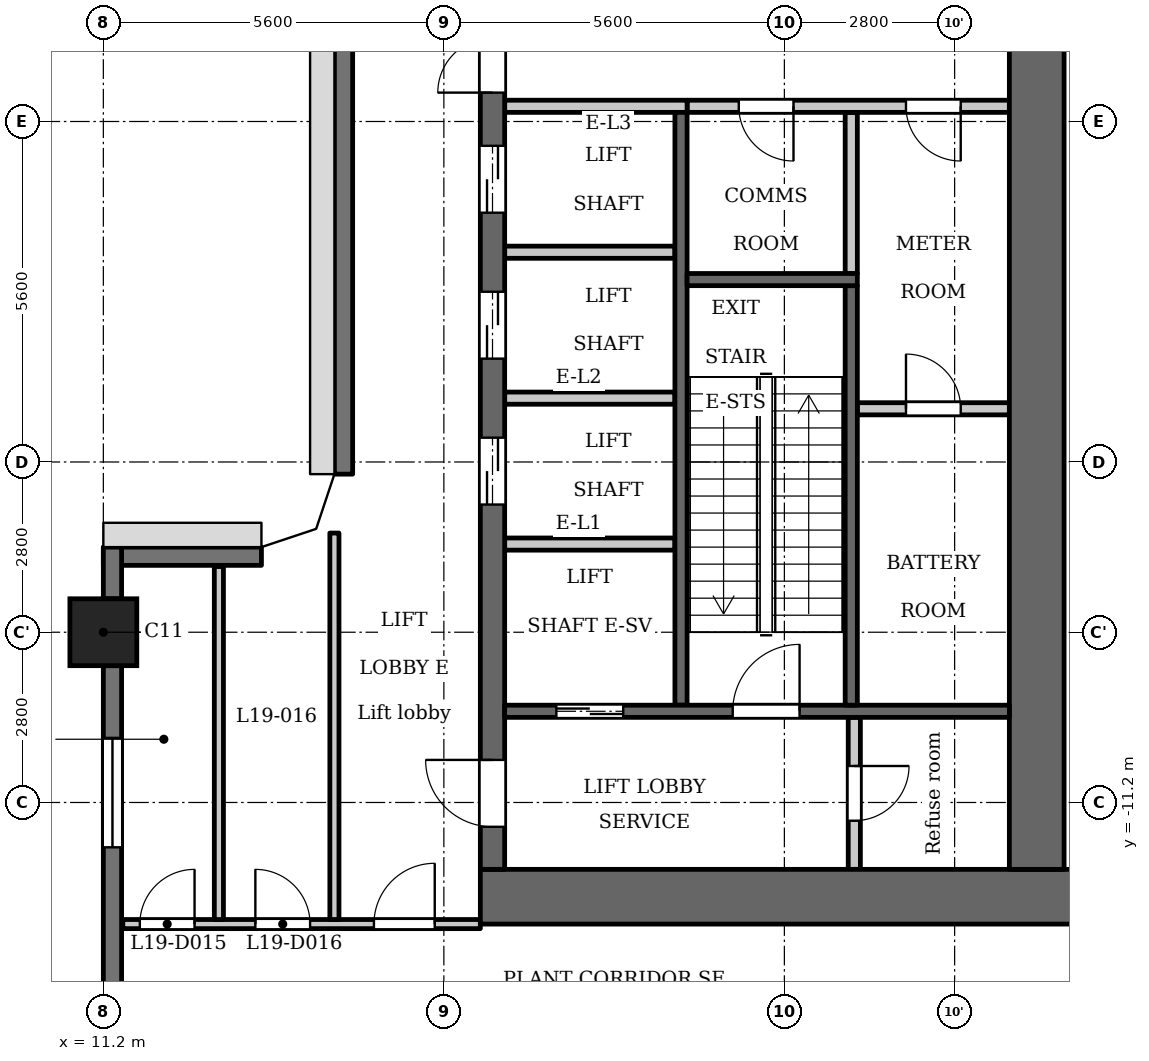
"""IFC4 building model, lengths in metres.
Left out: names, types, materials, properties, quantities, classifications, styles, units other than length and angle.
Written with IfcOpenShell. Run it as: python <this file> out.ifc"""

import sys

from ifc_helpers import new_model, si_unit, direction, frame, frame_2d, origin, origin_2d, place, context, subcontext, project, spatial, polyline, rectangle, outline, extrude, element, fill, save


model = new_model("IFC4")
c1 = context("Model", 3, precision=1e-05, world=origin(), true_north=direction((0.0, 1.0)))
c2 = subcontext(c1, "Body", "Model", "MODEL_VIEW")
j1 = project(units=[si_unit("LENGTHUNIT", "METRE"), si_unit("PLANEANGLEUNIT", "RADIAN")], contexts=[c1])
p1 = place(None, origin())
s1 = spatial("IfcSite", under=j1, at=p1, CompositionType="ELEMENT")
p2 = place(p1, origin())
s2 = spatial("IfcBuilding", under=s1, at=p2, CompositionType="ELEMENT")
p3 = place(p2, frame((0.0, 0.0, 77.9)))
s3 = spatial("IfcBuildingStorey", under=s2, at=p3, CompositionType="ELEMENT", Elevation=77.9)
p4 = place(p3, frame((11.2, -8.4, 0.0), z_axis=(0.0, 0.0, 1.0), x_axis=(1.0, 0.0, 0.0)))
e1 = element("IfcColumn", 1, at=p4, inside=s3, PredefinedType="COLUMN", context=c2, shape_type="SweptSolid", body=[
    extrude(rectangle(XDim=1.1, YDim=1.1, at=origin_2d()), origin(), (0.0, 0.0, 1.0), 5.4),
])
p5 = place(p3, frame((13.8, -7.15, 0.0), z_axis=(0.0, 0.0, 1.0), x_axis=(-1.0, 0.0, 0.0)))
e2 = element("IfcWall", 2, at=p5, inside=s3, PredefinedType="SOLIDWALL", context=c2, shape_type="SweptSolid", body=[
    extrude(rectangle(XDim=2.6, YDim=0.3, at=frame_2d((1.3, 0.0))), origin(), (0.0, 0.0, 1.0), 5.1),
])
p6 = place(p3, frame((11.35, -7.0, 0.0), z_axis=(0.0, 0.0, 1.0), x_axis=(0.0, -1.0, 0.0)))
e3 = element("IfcWall", 3, at=p6, inside=s3, PredefinedType="SOLIDWALL", context=c2, shape_type="SweptSolid", body=[
    extrude(rectangle(XDim=0.85, YDim=0.3, at=frame_2d((0.425, 0.0))), origin(), (0.0, 0.0, 1.0), 5.1),
])
p7 = place(p3, frame((11.35, -8.95, 0.0), z_axis=(0.0, 0.0, 1.0), x_axis=(0.0, -1.0, 0.0)))
e4 = element("IfcWall", 4, at=p7, inside=s3, PredefinedType="SOLIDWALL", context=c2, shape_type="SweptSolid", body=[
    extrude(rectangle(XDim=5.975, YDim=0.3, at=frame_2d((2.988, 0.0))), origin(), (0.0, 0.0, 1.0), 5.1),
])
p8 = place(p7, frame((1.188, 0.0, 0.9)))
e5 = element("IfcOpeningElement", 5, at=p8, cuts=e4, PredefinedType="OPENING", context=c2, shape_type="SweptSolid", body=[
    extrude(rectangle(XDim=1.8, YDim=1.5, at=frame_2d((0.9, 0.75))), frame((0.0, 0.16, 0.0), z_axis=(0.0, -1.0, 0.0), x_axis=(1.0, 0.0, 0.0)), (0.0, 0.0, 1.0), 0.32),
])
p9 = place(p3, frame((15.15, 5.8, 0.0), z_axis=(0.0, 0.0, 1.0), x_axis=(0.0, -1.0, 0.0)))
e6 = element("IfcWall", 6, at=p9, inside=s3, PredefinedType="SOLIDWALL", context=c2, shape_type="SweptSolid", body=[
    extrude(rectangle(XDim=11.6, YDim=0.3, at=frame_2d((5.8, 0.0))), origin(), (0.0, 0.0, 1.0), 5.1),
])
p10 = place(p3, frame((23.5, -2.5, 0.0), z_axis=(0.0, 0.0, 1.0), x_axis=(0.0, 1.0, 0.0)))
e7 = element("IfcWall", 7, at=p10, inside=s3, PredefinedType="PARTITIONING", context=c2, shape_type="SweptSolid", body=[
    extrude(rectangle(XDim=2.65, YDim=0.2, at=frame_2d((1.325, 0.0))), origin(), (0.0, 0.0, 1.0), 5.1),
])
p11 = place(p3, frame((20.7, -9.6, 0.0), z_axis=(0.0, 0.0, 1.0), x_axis=(0.0, 1.0, 0.0)))
e8 = element("IfcWall", 8, at=p11, inside=s3, PredefinedType="SHEAR", context=c2, shape_type="SweptSolid", body=[
    extrude(rectangle(XDim=9.75, YDim=0.2, at=frame_2d((4.875, 0.0))), origin(), (0.0, 0.0, 1.0), 5.1),
])
p12 = place(p3, frame((20.8, 0.25, 0.0), z_axis=(0.0, 0.0, 1.0), x_axis=(1.0, 0.0, 0.0)))
e9 = element("IfcWall", 9, at=p12, inside=s3, PredefinedType="PARTITIONING", context=c2, shape_type="SweptSolid", body=[
    extrude(rectangle(XDim=5.3, YDim=0.2, at=frame_2d((2.65, 0.0))), origin(), (0.0, 0.0, 1.0), 5.1),
])
p13 = place(p12, frame((0.85, 0.0, 0.0)))
e10 = element("IfcOpeningElement", 10, at=p13, cuts=e9, PredefinedType="OPENING", context=c2, shape_type="SweptSolid", body=[
    extrude(rectangle(XDim=0.9, YDim=2.1, at=frame_2d((0.45, 1.05))), frame((0.0, 0.11, 0.0), z_axis=(0.0, -1.0, 0.0), x_axis=(1.0, 0.0, 0.0)), (0.0, 0.0, 1.0), 0.22),
])
p14 = place(p12, frame((3.6, 0.0, 0.0)))
e11 = element("IfcOpeningElement", 11, at=p14, cuts=e9, PredefinedType="OPENING", context=c2, shape_type="SweptSolid", body=[
    extrude(rectangle(XDim=0.9, YDim=2.1, at=frame_2d((0.45, 1.05))), frame((0.0, 0.11, 0.0), z_axis=(0.0, -1.0, 0.0), x_axis=(1.0, 0.0, 0.0)), (0.0, 0.0, 1.0), 0.22),
])
p15 = place(p3, frame((17.4, -12.75, 0.0), z_axis=(0.0, 0.0, 1.0), x_axis=(1.0, 0.0, 0.0)))
e12 = element("IfcWall", 12, at=p15, inside=s3, PredefinedType="SHEAR", context=c2, shape_type="SweptSolid", body=[
    extrude(rectangle(XDim=10.4, YDim=0.9, at=frame_2d((5.2, 0.0))), origin(), (0.0, 0.0, 1.0), 5.1),
])
p16 = place(p3, frame((17.6, -12.3, 0.0), z_axis=(0.0, 0.0, 1.0), x_axis=(0.0, 1.0, 0.0)))
e13 = element("IfcWall", 13, at=p16, inside=s3, PredefinedType="SHEAR", context=c2, shape_type="SweptSolid", body=[
    extrude(rectangle(XDim=24.6, YDim=0.4, at=frame_2d((12.3, 0.0))), origin(), (0.0, 0.0, 1.0), 5.1),
])
p17 = place(p16, frame((6.0, 0.0, 0.0)))
e14 = element("IfcOpeningElement", 14, at=p17, cuts=e13, PredefinedType="OPENING", context=c2, shape_type="SweptSolid", body=[
    extrude(rectangle(XDim=1.1, YDim=2.1, at=frame_2d((0.55, 1.05))), frame((0.0, 0.21, 0.0), z_axis=(0.0, -1.0, 0.0), x_axis=(1.0, 0.0, 0.0)), (0.0, 0.0, 1.0), 0.42),
])
p18 = place(p16, frame((8.4, 0.0, 0.0)))
e15 = element("IfcOpeningElement", 15, at=p18, cuts=e13, PredefinedType="OPENING", context=c2, shape_type="SweptSolid", body=[
    extrude(rectangle(XDim=1.1, YDim=2.1, at=frame_2d((0.55, 1.05))), frame((0.0, 0.21, 0.0), z_axis=(0.0, -1.0, 0.0), x_axis=(1.0, 0.0, 0.0)), (0.0, 0.0, 1.0), 0.42),
])
p19 = place(p16, frame((10.8, 0.0, 0.0)))
e16 = element("IfcOpeningElement", 16, at=p19, cuts=e13, PredefinedType="OPENING", context=c2, shape_type="SweptSolid", body=[
    extrude(rectangle(XDim=1.1, YDim=2.1, at=frame_2d((0.55, 1.05))), frame((0.0, 0.21, 0.0), z_axis=(0.0, -1.0, 0.0), x_axis=(1.0, 0.0, 0.0)), (0.0, 0.0, 1.0), 0.42),
])
p20 = place(p16, frame((16.75, 0.0, 0.0)))
e17 = element("IfcOpeningElement", 17, at=p20, cuts=e13, PredefinedType="OPENING", context=c2, shape_type="SweptSolid", body=[
    extrude(rectangle(XDim=0.9, YDim=2.1, at=frame_2d((0.45, 1.05))), frame((0.0, 0.21, 0.0), z_axis=(0.0, -1.0, 0.0), x_axis=(1.0, 0.0, 0.0)), (0.0, 0.0, 1.0), 0.42),
])
p21 = place(p16, frame((22.8, 0.0, 0.0)))
e18 = element("IfcOpeningElement", 18, at=p21, cuts=e13, PredefinedType="OPENING", context=c2, shape_type="SweptSolid", body=[
    extrude(rectangle(XDim=1.1, YDim=2.1, at=frame_2d((0.55, 1.05))), frame((0.0, 0.21, 0.0), z_axis=(0.0, -1.0, 0.0), x_axis=(1.0, 0.0, 0.0)), (0.0, 0.0, 1.0), 0.42),
])
p22 = place(p16, frame((0.7, 0.0, 0.0)))
e19 = element("IfcOpeningElement", 19, at=p22, cuts=e13, PredefinedType="OPENING", context=c2, shape_type="SweptSolid", body=[
    extrude(rectangle(XDim=1.1, YDim=2.1, at=frame_2d((0.55, 1.05))), frame((0.0, 0.21, 0.0), z_axis=(0.0, -1.0, 0.0), x_axis=(1.0, 0.0, 0.0)), (0.0, 0.0, 1.0), 0.42),
])
p23 = place(p16, frame((12.775, 0.0, 0.0)))
e20 = element("IfcOpeningElement", 20, at=p23, cuts=e13, PredefinedType="OPENING", context=c2, shape_type="SweptSolid", body=[
    extrude(rectangle(XDim=1.8, YDim=2.1, at=frame_2d((0.9, 1.05))), frame((0.0, 0.21, 0.0), z_axis=(0.0, -1.0, 0.0), x_axis=(1.0, 0.0, 0.0)), (0.0, 0.0, 1.0), 0.42),
])
p24 = place(p3, frame((26.55, -12.3, 0.0), z_axis=(0.0, 0.0, 1.0), x_axis=(0.0, 1.0, 0.0)))
e21 = element("IfcWall", 21, at=p24, inside=s3, PredefinedType="SHEAR", context=c2, shape_type="SweptSolid", body=[
    extrude(rectangle(XDim=24.6, YDim=0.9, at=frame_2d((12.3, 0.0))), origin(), (0.0, 0.0, 1.0), 5.1),
])
p25 = place(p3, frame((23.55, -12.3, 0.0), z_axis=(0.0, 0.0, 1.0), x_axis=(0.0, 1.0, 0.0)))
e22 = element("IfcWall", 22, at=p25, inside=s3, PredefinedType="PARTITIONING", context=c2, shape_type="SweptSolid", body=[
    extrude(rectangle(XDim=2.5, YDim=0.2, at=frame_2d((1.25, 0.0))), origin(), (0.0, 0.0, 1.0), 5.1),
])
p26 = place(p25, frame((0.8, 0.0, 0.0)))
e23 = element("IfcOpeningElement", 23, at=p26, cuts=e22, PredefinedType="OPENING", context=c2, shape_type="SweptSolid", body=[
    extrude(rectangle(XDim=0.9, YDim=2.1, at=frame_2d((0.45, 1.05))), frame((0.0, 0.11, 0.0), z_axis=(0.0, -1.0, 0.0), x_axis=(1.0, 0.0, 0.0)), (0.0, 0.0, 1.0), 0.22),
])
p27 = place(p3, frame((23.6, -4.725, 0.0), z_axis=(0.0, 0.0, 1.0), x_axis=(1.0, 0.0, 0.0)))
e24 = element("IfcWall", 24, at=p27, inside=s3, PredefinedType="PARTITIONING", context=c2, shape_type="SweptSolid", body=[
    extrude(rectangle(XDim=2.5, YDim=0.2, at=frame_2d((1.25, 0.0))), origin(), (0.0, 0.0, 1.0), 5.1),
])
p28 = place(p27, frame((0.8, 0.0, 0.0)))
e25 = element("IfcOpeningElement", 25, at=p28, cuts=e24, PredefinedType="OPENING", context=c2, shape_type="SweptSolid", body=[
    extrude(rectangle(XDim=0.9, YDim=2.1, at=frame_2d((0.45, 1.05))), frame((0.0, 0.11, 0.0), z_axis=(0.0, -1.0, 0.0), x_axis=(1.0, 0.0, 0.0)), (0.0, 0.0, 1.0), 0.22),
])
p29 = place(p3, frame((17.8, -9.7, 0.0), z_axis=(0.0, 0.0, 1.0), x_axis=(1.0, 0.0, 0.0)))
e26 = element("IfcWall", 26, at=p29, inside=s3, PredefinedType="SHEAR", context=c2, shape_type="SweptSolid", body=[
    extrude(rectangle(XDim=8.3, YDim=0.2, at=frame_2d((4.15, 0.0))), origin(), (0.0, 0.0, 1.0), 5.1),
])
p30 = place(p29, frame((0.85, 0.0, 0.0)))
e27 = element("IfcOpeningElement", 27, at=p30, cuts=e26, PredefinedType="OPENING", context=c2, shape_type="SweptSolid", body=[
    extrude(rectangle(XDim=1.1, YDim=2.1, at=frame_2d((0.55, 1.05))), frame((0.0, 0.11, 0.0), z_axis=(0.0, -1.0, 0.0), x_axis=(1.0, 0.0, 0.0)), (0.0, 0.0, 1.0), 0.22),
])
p31 = place(p29, frame((3.75, 0.0, 0.0)))
e28 = element("IfcOpeningElement", 28, at=p31, cuts=e26, PredefinedType="OPENING", context=c2, shape_type="SweptSolid", body=[
    extrude(rectangle(XDim=1.1, YDim=2.1, at=frame_2d((0.55, 1.05))), frame((0.0, 0.11, 0.0), z_axis=(0.0, -1.0, 0.0), x_axis=(1.0, 0.0, 0.0)), (0.0, 0.0, 1.0), 0.22),
])
for number, where, z_axis, x_axis in (
    (29, (17.8, -6.95, 0.0), (0.0, 0.0, 1.0), (1.0, 0.0, 0.0)),
    (30, (17.8, -4.55, 0.0), (0.0, 0.0, 1.0), (1.0, 0.0, 0.0)),
    (31, (17.8, -2.15, 0.0), (0.0, 0.0, 1.0), (1.0, 0.0, 0.0)),
):
    element("IfcWall", number, at=place(p3, frame(where, z_axis=z_axis, x_axis=x_axis)), inside=s3, PredefinedType="PARTITIONING", context=c2, shape_type="SweptSolid", body=[
        extrude(rectangle(XDim=2.8, YDim=0.2, at=frame_2d((1.4, 0.0))), origin(), (0.0, 0.0, 1.0), 5.1),
    ])
p32 = place(p3, frame((17.8, 0.25, 0.0), z_axis=(0.0, 0.0, 1.0), x_axis=(1.0, 0.0, 0.0)))
e32 = element("IfcWall", 32, at=p32, inside=s3, PredefinedType="PARTITIONING", context=c2, shape_type="SweptSolid", body=[
    extrude(rectangle(XDim=3.0, YDim=0.2, at=frame_2d((1.5, 0.0))), origin(), (0.0, 0.0, 1.0), 5.1),
])
p33 = place(p3, frame((23.5, -9.6, 0.0), z_axis=(0.0, 0.0, 1.0), x_axis=(0.0, 1.0, 0.0)))
e33 = element("IfcWall", 33, at=p33, inside=s3, PredefinedType="SHEAR", context=c2, shape_type="SweptSolid", body=[
    extrude(rectangle(XDim=6.9, YDim=0.2, at=frame_2d((3.45, 0.0))), origin(), (0.0, 0.0, 1.0), 5.1),
])
p34 = place(p3, frame((20.8, -2.6, 0.0), z_axis=(0.0, 0.0, 1.0), x_axis=(1.0, 0.0, 0.0)))
e34 = element("IfcWall", 34, at=p34, inside=s3, PredefinedType="SHEAR", context=c2, shape_type="SweptSolid", body=[
    extrude(rectangle(XDim=2.8, YDim=0.2, at=frame_2d((1.4, 0.0))), origin(), (0.0, 0.0, 1.0), 5.1),
])
p35 = place(p3, frame((11.52, -13.2, 0.0), z_axis=(0.0, 0.0, 1.0), x_axis=(1.0, 0.0, 0.0)))
e35 = element("IfcWall", 35, at=p35, inside=s3, PredefinedType="PARTITIONING", context=c2, shape_type="SweptSolid", body=[
    extrude(rectangle(XDim=5.88, YDim=0.15, at=frame_2d((2.94, 0.0))), origin(), (0.0, 0.0, 1.0), 5.1),
])
p36 = place(p35, frame((4.13, 0.0, 0.0)))
e36 = element("IfcOpeningElement", 36, at=p36, cuts=e35, PredefinedType="OPENING", context=c2, shape_type="SweptSolid", body=[
    extrude(rectangle(XDim=1.0, YDim=2.1, at=frame_2d((0.5, 1.05))), frame((0.0, 0.085, 0.0), z_axis=(0.0, -1.0, 0.0), x_axis=(1.0, 0.0, 0.0)), (0.0, 0.0, 1.0), 0.17),
])
p37 = place(p35, frame((0.28, 0.0, 0.0)))
e37 = element("IfcOpeningElement", 37, at=p37, cuts=e35, PredefinedType="OPENING", context=c2, shape_type="SweptSolid", body=[
    extrude(rectangle(XDim=0.9, YDim=2.1, at=frame_2d((0.45, 1.05))), frame((0.0, 0.085, 0.0), z_axis=(0.0, -1.0, 0.0), x_axis=(1.0, 0.0, 0.0)), (0.0, 0.0, 1.0), 0.17),
])
p38 = place(p35, frame((2.18, 0.0, 0.0)))
e38 = element("IfcOpeningElement", 38, at=p38, cuts=e35, PredefinedType="OPENING", context=c2, shape_type="SweptSolid", body=[
    extrude(rectangle(XDim=0.9, YDim=2.1, at=frame_2d((0.45, 1.05))), frame((0.0, 0.085, 0.0), z_axis=(0.0, -1.0, 0.0), x_axis=(1.0, 0.0, 0.0)), (0.0, 0.0, 1.0), 0.17),
])
p39 = place(p3, frame((13.1, -13.125, 0.0), z_axis=(0.0, 0.0, 1.0), x_axis=(0.0, 1.0, 0.0)))
e39 = element("IfcWall", 39, at=p39, inside=s3, PredefinedType="PARTITIONING", context=c2, shape_type="SweptSolid", body=[
    extrude(rectangle(XDim=5.805, YDim=0.15, at=frame_2d((2.902, 0.0))), origin(), (0.0, 0.0, 1.0), 5.1),
])
p40 = place(p3, frame((15.0, -13.125, 0.0), z_axis=(0.0, 0.0, 1.0), x_axis=(0.0, 1.0, 0.0)))
e40 = element("IfcWall", 40, at=p40, inside=s3, PredefinedType="PARTITIONING", context=c2, shape_type="SweptSolid", body=[
    extrude(rectangle(XDim=6.356, YDim=0.15, at=frame_2d((3.178, 0.0))), origin(), (0.0, 0.0, 1.0), 5.1),
])
p41 = place(p3, origin())
e41 = element("IfcWall", 41, at=p41, inside=s3, PredefinedType="SOLIDWALL", context=c2, shape_type="SweptSolid", body=[
    extrude(outline(polyline([(15.0, -5.8), (14.7, -6.7), (13.8, -7.0), (13.8, -7.3), (13.849, -7.3), (14.937, -6.937), (15.3, -5.849), (15.3, -5.8), (15.0, -5.8)])), origin(), (0.0, 0.0, 1.0), 5.1),
])
p42 = place(p30, origin())
e42 = element("IfcDoor", 42, at=p42, inside=s3, OperationType="DOUBLE_DOOR_SLIDING", PredefinedType="DOOR", context=c2, shape_type="SweptSolid", body=[
    extrude(rectangle(XDim=1.1, YDim=2.1, at=frame_2d((0.55, 1.05))), frame((0.0, 0.025, 0.0), z_axis=(0.0, -1.0, 0.0), x_axis=(1.0, 0.0, 0.0)), (0.0, 0.0, 1.0), 0.05),
])
fill(e27, e42)
p43 = place(p17, origin())
e43 = element("IfcDoor", 43, at=p43, inside=s3, OperationType="DOUBLE_DOOR_SLIDING", PredefinedType="DOOR", context=c2, shape_type="SweptSolid", body=[
    extrude(rectangle(XDim=1.1, YDim=2.1, at=frame_2d((0.55, 1.05))), frame((0.0, 0.025, 0.0), z_axis=(0.0, -1.0, 0.0), x_axis=(1.0, 0.0, 0.0)), (0.0, 0.0, 1.0), 0.05),
])
fill(e14, e43)
p44 = place(p18, origin())
e44 = element("IfcDoor", 44, at=p44, inside=s3, OperationType="DOUBLE_DOOR_SLIDING", PredefinedType="DOOR", context=c2, shape_type="SweptSolid", body=[
    extrude(rectangle(XDim=1.1, YDim=2.1, at=frame_2d((0.55, 1.05))), frame((0.0, 0.025, 0.0), z_axis=(0.0, -1.0, 0.0), x_axis=(1.0, 0.0, 0.0)), (0.0, 0.0, 1.0), 0.05),
])
fill(e15, e44)
p45 = place(p19, origin())
e45 = element("IfcDoor", 45, at=p45, inside=s3, OperationType="DOUBLE_DOOR_SLIDING", PredefinedType="DOOR", context=c2, shape_type="SweptSolid", body=[
    extrude(rectangle(XDim=1.1, YDim=2.1, at=frame_2d((0.55, 1.05))), frame((0.0, 0.025, 0.0), z_axis=(0.0, -1.0, 0.0), x_axis=(1.0, 0.0, 0.0)), (0.0, 0.0, 1.0), 0.05),
])
fill(e16, e45)
p46 = place(p22, origin())
e46 = element("IfcDoor", 46, at=p46, inside=s3, OperationType="SINGLE_SWING_LEFT", PredefinedType="DOOR", context=c2, shape_type="SweptSolid", body=[
    extrude(rectangle(XDim=1.1, YDim=2.1, at=frame_2d((0.55, 1.05))), frame((0.0, 0.025, 0.0), z_axis=(0.0, -1.0, 0.0), x_axis=(1.0, 0.0, 0.0)), (0.0, 0.0, 1.0), 0.05),
])
fill(e19, e46)
p47 = place(p26, origin())
e47 = element("IfcDoor", 47, at=p47, inside=s3, OperationType="SINGLE_SWING_RIGHT", PredefinedType="DOOR", context=c2, shape_type="SweptSolid", body=[
    extrude(rectangle(XDim=0.9, YDim=2.1, at=frame_2d((0.45, 1.05))), frame((0.0, 0.025, 0.0), z_axis=(0.0, -1.0, 0.0), x_axis=(1.0, 0.0, 0.0)), (0.0, 0.0, 1.0), 0.05),
])
fill(e23, e47)
p48 = place(p31, origin())
e48 = element("IfcDoor", 48, at=p48, inside=s3, OperationType="SINGLE_SWING_LEFT", PredefinedType="DOOR", context=c2, shape_type="SweptSolid", body=[
    extrude(rectangle(XDim=1.1, YDim=2.1, at=frame_2d((0.55, 1.05))), frame((0.0, 0.025, 0.0), z_axis=(0.0, -1.0, 0.0), x_axis=(1.0, 0.0, 0.0)), (0.0, 0.0, 1.0), 0.05),
])
fill(e28, e48)
p49 = place(p23, origin())
e49 = element("IfcDoor", 49, at=p49, inside=s3, OperationType="DOUBLE_DOOR_SINGLE_SWING", PredefinedType="DOOR", context=c2, shape_type="SweptSolid", body=[
    extrude(rectangle(XDim=1.8, YDim=2.1, at=frame_2d((0.9, 1.05))), frame((0.0, 0.025, 0.0), z_axis=(0.0, -1.0, 0.0), x_axis=(1.0, 0.0, 0.0)), (0.0, 0.0, 1.0), 0.05),
])
fill(e20, e49)
p50 = place(p13, origin())
e50 = element("IfcDoor", 50, at=p50, inside=s3, OperationType="SINGLE_SWING_RIGHT", PredefinedType="DOOR", context=c2, shape_type="SweptSolid", body=[
    extrude(rectangle(XDim=0.9, YDim=2.1, at=frame_2d((0.45, 1.05))), frame((0.0, 0.025, 0.0), z_axis=(0.0, -1.0, 0.0), x_axis=(1.0, 0.0, 0.0)), (0.0, 0.0, 1.0), 0.05),
])
fill(e10, e50)
p51 = place(p28, origin())
e51 = element("IfcDoor", 51, at=p51, inside=s3, OperationType="SINGLE_SWING_RIGHT", PredefinedType="DOOR", context=c2, shape_type="SweptSolid", body=[
    extrude(rectangle(XDim=0.9, YDim=2.1, at=frame_2d((0.45, 1.05))), frame((0.0, 0.025, 0.0), z_axis=(0.0, -1.0, 0.0), x_axis=(1.0, 0.0, 0.0)), (0.0, 0.0, 1.0), 0.05),
])
fill(e25, e51)
p52 = place(p14, origin())
e52 = element("IfcDoor", 52, at=p52, inside=s3, OperationType="SINGLE_SWING_RIGHT", PredefinedType="DOOR", context=c2, shape_type="SweptSolid", body=[
    extrude(rectangle(XDim=0.9, YDim=2.1, at=frame_2d((0.45, 1.05))), frame((0.0, 0.025, 0.0), z_axis=(0.0, -1.0, 0.0), x_axis=(1.0, 0.0, 0.0)), (0.0, 0.0, 1.0), 0.05),
])
fill(e11, e52)
p53 = place(p36, origin())
e53 = element("IfcDoor", 53, at=p53, inside=s3, OperationType="SINGLE_SWING_LEFT", PredefinedType="DOOR", context=c2, shape_type="SweptSolid", body=[
    extrude(rectangle(XDim=1.0, YDim=2.1, at=frame_2d((0.5, 1.05))), frame((0.0, 0.025, 0.0), z_axis=(0.0, -1.0, 0.0), x_axis=(1.0, 0.0, 0.0)), (0.0, 0.0, 1.0), 0.05),
])
fill(e36, e53)
p54 = place(p37, origin())
e54 = element("IfcDoor", 54, at=p54, inside=s3, OperationType="SINGLE_SWING_LEFT", PredefinedType="DOOR", context=c2, shape_type="SweptSolid", body=[
    extrude(rectangle(XDim=0.9, YDim=2.1, at=frame_2d((0.45, 1.05))), frame((0.0, 0.025, 0.0), z_axis=(0.0, -1.0, 0.0), x_axis=(1.0, 0.0, 0.0)), (0.0, 0.0, 1.0), 0.05),
])
fill(e37, e54)
p55 = place(p38, origin())
e55 = element("IfcDoor", 55, at=p55, inside=s3, OperationType="SINGLE_SWING_RIGHT", PredefinedType="DOOR", context=c2, shape_type="SweptSolid", body=[
    extrude(rectangle(XDim=0.9, YDim=2.1, at=frame_2d((0.45, 1.05))), frame((0.0, 0.025, 0.0), z_axis=(0.0, -1.0, 0.0), x_axis=(1.0, 0.0, 0.0)), (0.0, 0.0, 1.0), 0.05),
])
fill(e38, e55)
p56 = place(p8, origin())
e56 = element("IfcWindow", 56, at=p56, inside=s3, PartitioningType="SINGLE_PANEL", PredefinedType="WINDOW", context=c2, shape_type="SweptSolid", body=[
    extrude(rectangle(XDim=1.8, YDim=1.5, at=frame_2d((0.9, 0.75))), frame((0.0, 0.03, 0.0), z_axis=(0.0, -1.0, 0.0), x_axis=(1.0, 0.0, 0.0)), (0.0, 0.0, 1.0), 0.06),
])
fill(e5, e56)
save(model, sys.argv[1])
